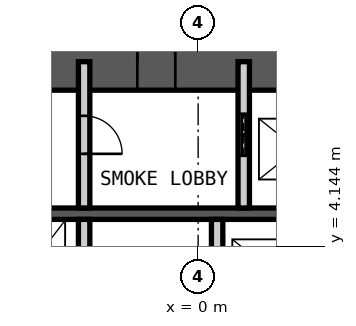
"""IFC4 building model, lengths in metres.
Left out: names, types, materials, properties, quantities, classifications, styles, units other than length and angle.
Written with IfcOpenShell. Run it as: python <this file> out.ifc"""

import sys

from ifc_helpers import new_model, si_unit, direction, frame, frame_2d, origin, place, context, subcontext, project, spatial, rectangle, extrude, element, fill, save


model = new_model("IFC4")
c1 = context("Model", 3, precision=1e-05, world=origin(), true_north=direction((0.0, 1.0)))
c2 = subcontext(c1, "Body", "Model", "MODEL_VIEW")
j1 = project(units=[si_unit("LENGTHUNIT", "METRE"), si_unit("PLANEANGLEUNIT", "RADIAN")], contexts=[c1])
p1 = place(None, origin())
s1 = spatial("IfcSite", under=j1, at=p1, CompositionType="ELEMENT")
p2 = place(p1, origin())
s2 = spatial("IfcBuilding", under=s1, at=p2, CompositionType="ELEMENT")
p3 = place(p2, frame((0.0, 0.0, 82.0)))
s3 = spatial("IfcBuildingStorey", under=s2, at=p3, CompositionType="ELEMENT", Elevation=82.0)
p4 = place(p3, frame((-12.0, 9.0, 0.0), z_axis=(0.0, 0.0, 1.0), x_axis=(1.0, 0.0, 0.0)))
e1 = element("IfcWall", 1, at=p4, inside=s3, PredefinedType="SHEAR", context=c2, shape_type="SweptSolid", body=[
    extrude(rectangle(XDim=24.0, YDim=1.5, at=frame_2d((12.0, 0.0))), origin(), (0.0, 0.0, 1.0), 5.0),
])
p5 = place(p4, frame((10.4, 0.0, 0.0)))
e2 = element("IfcOpeningElement", 2, at=p5, cuts=e1, PredefinedType="OPENING", context=c2, shape_type="SweptSolid", body=[
    extrude(rectangle(XDim=1.0, YDim=2.1, at=frame_2d((0.5, 1.05))), frame((0.0, 0.76, 0.0), z_axis=(0.0, -1.0, 0.0), x_axis=(1.0, 0.0, 0.0)), (0.0, 0.0, 1.0), 1.52),
])
p6 = place(p4, frame((17.6, 0.0, 0.0)))
e3 = element("IfcOpeningElement", 3, at=p6, cuts=e1, PredefinedType="OPENING", context=c2, shape_type="SweptSolid", body=[
    extrude(rectangle(XDim=0.9, YDim=2.1, at=frame_2d((0.45, 1.05))), frame((0.0, 0.76, 0.0), z_axis=(0.0, -1.0, 0.0), x_axis=(1.0, 0.0, 0.0)), (0.0, 0.0, 1.0), 1.52),
])
p7 = place(p4, frame((21.9, 0.0, 0.0)))
e4 = element("IfcOpeningElement", 4, at=p7, cuts=e1, PredefinedType="OPENING", context=c2, shape_type="SweptSolid", body=[
    extrude(rectangle(XDim=0.9, YDim=2.1, at=frame_2d((0.45, 1.05))), frame((0.0, 0.76, 0.0), z_axis=(0.0, -1.0, 0.0), x_axis=(1.0, 0.0, 0.0)), (0.0, 0.0, 1.0), 1.52),
])
p8 = place(p3, frame((-12.0, 5.0, 0.0), z_axis=(0.0, 0.0, 1.0), x_axis=(1.0, 0.0, 0.0)))
e5 = element("IfcWall", 5, at=p8, inside=s3, PredefinedType="SHEAR", context=c2, shape_type="SweptSolid", body=[
    extrude(rectangle(XDim=24.0, YDim=0.3, at=frame_2d((12.0, 0.0))), origin(), (0.0, 0.0, 1.0), 5.0),
])
p9 = place(p3, frame((-3.0, 5.15, 0.0), z_axis=(0.0, 0.0, 1.0), x_axis=(0.0, 1.0, 0.0)))
e6 = element("IfcWall", 6, at=p9, inside=s3, PredefinedType="PARTITIONING", context=c2, shape_type="SweptSolid", body=[
    extrude(rectangle(XDim=3.85, YDim=0.3, at=frame_2d((1.925, 0.0))), origin(), (0.0, 0.0, 1.0), 4.78),
])
p10 = place(p9, frame((1.425, 0.0, 0.0)))
e7 = element("IfcOpeningElement", 7, at=p10, cuts=e6, PredefinedType="OPENING", context=c2, shape_type="SweptSolid", body=[
    extrude(rectangle(XDim=1.0, YDim=2.1, at=frame_2d((0.5, 1.05))), frame((0.0, 0.16, 0.0), z_axis=(0.0, -1.0, 0.0), x_axis=(1.0, 0.0, 0.0)), (0.0, 0.0, 1.0), 0.32),
])
p11 = place(p3, frame((1.2, 5.15, 0.0), z_axis=(0.0, 0.0, 1.0), x_axis=(0.0, 1.0, 0.0)))
e8 = element("IfcWall", 8, at=p11, inside=s3, PredefinedType="PARTITIONING", context=c2, shape_type="SweptSolid", body=[
    extrude(rectangle(XDim=3.85, YDim=0.3, at=frame_2d((1.925, 0.0))), origin(), (0.0, 0.0, 1.0), 4.78),
])
p12 = place(p11, frame((1.375, 0.0, 0.0)))
e9 = element("IfcOpeningElement", 9, at=p12, cuts=e8, PredefinedType="OPENING", context=c2, shape_type="SweptSolid", body=[
    extrude(rectangle(XDim=1.1, YDim=2.4, at=frame_2d((0.55, 1.2))), frame((0.0, 0.16, 0.0), z_axis=(0.0, -1.0, 0.0), x_axis=(1.0, 0.0, 0.0)), (0.0, 0.0, 1.0), 0.32),
])
for number, where, z_axis, x_axis in (
    (10, (-3.0, 2.2, 0.0), (0.0, 0.0, 1.0), (0.0, 1.0, 0.0)),
    (11, (0.5, 2.2, 0.0), (0.0, 0.0, 1.0), (0.0, 1.0, 0.0)),
):
    element("IfcWall", number, at=place(p3, frame(where, z_axis=z_axis, x_axis=x_axis)), inside=s3, PredefinedType="PARTITIONING", context=c2, shape_type="SweptSolid", body=[
        extrude(rectangle(XDim=2.65, YDim=0.3, at=frame_2d((1.325, 0.0))), origin(), (0.0, 0.0, 1.0), 4.78),
    ])
p13 = place(p5, origin())
e12 = element("IfcDoor", 12, at=p13, inside=s3, OperationType="SINGLE_SWING_RIGHT", PredefinedType="DOOR", context=c2, shape_type="SweptSolid", body=[
    extrude(rectangle(XDim=1.0, YDim=2.1, at=frame_2d((0.5, 1.05))), frame((0.0, 0.025, 0.0), z_axis=(0.0, -1.0, 0.0), x_axis=(1.0, 0.0, 0.0)), (0.0, 0.0, 1.0), 0.05),
])
fill(e2, e12)
p14 = place(p10, origin())
e13 = element("IfcDoor", 13, at=p14, inside=s3, OperationType="SINGLE_SWING_LEFT", PredefinedType="DOOR", context=c2, shape_type="SweptSolid", body=[
    extrude(rectangle(XDim=1.0, YDim=2.1, at=frame_2d((0.5, 1.05))), frame((0.0, 0.025, 0.0), z_axis=(0.0, -1.0, 0.0), x_axis=(1.0, 0.0, 0.0)), (0.0, 0.0, 1.0), 0.05),
])
fill(e7, e13)
p15 = place(p12, origin())
e14 = element("IfcDoor", 14, at=p15, inside=s3, OperationType="DOUBLE_DOOR_SLIDING", PredefinedType="DOOR", context=c2, shape_type="SweptSolid", body=[
    extrude(rectangle(XDim=1.1, YDim=2.4, at=frame_2d((0.55, 1.2))), frame((0.0, 0.025, 0.0), z_axis=(0.0, -1.0, 0.0), x_axis=(1.0, 0.0, 0.0)), (0.0, 0.0, 1.0), 0.05),
])
fill(e9, e14)
save(model, sys.argv[1])
